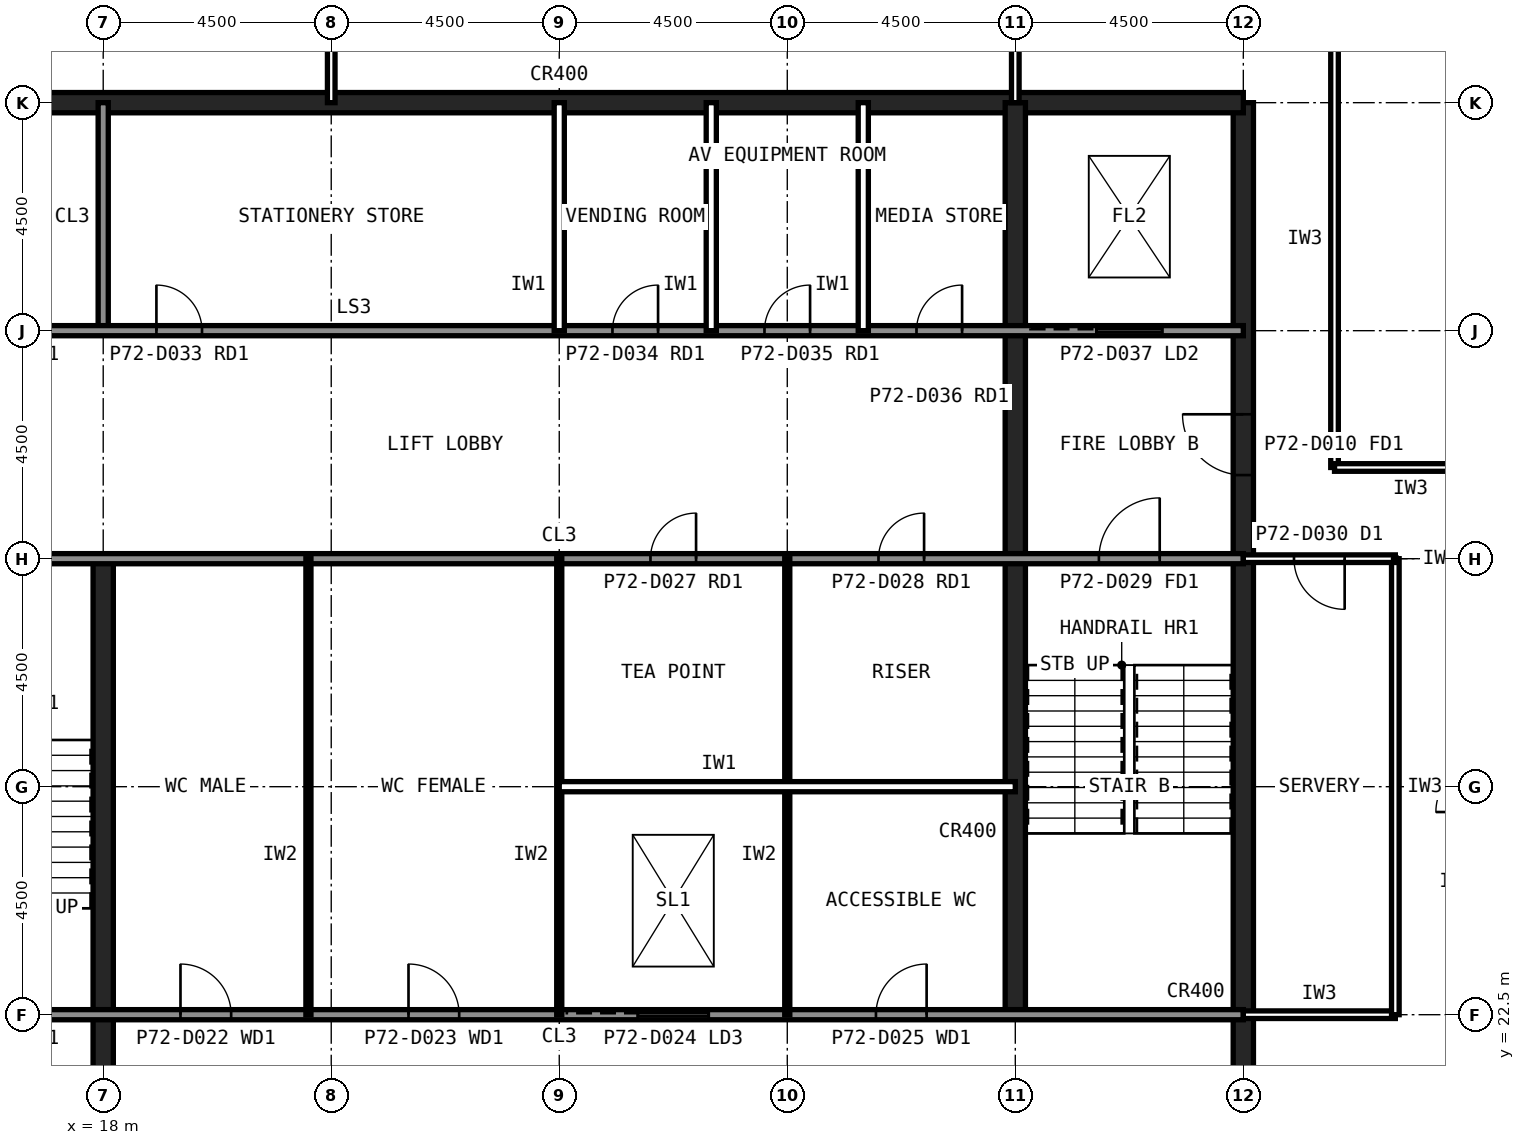
"""IFC4 building model, lengths in metres.
Left out: names, types, materials, properties, quantities, classifications, styles, units other than length and angle.
Written with IfcOpenShell. Run it as: python <this file> out.ifc"""

import sys

from ifc_helpers import new_model, si_unit, direction, frame, frame_2d, origin, place, context, subcontext, project, spatial, rectangle, extrude, element, fill, save


model = new_model("IFC4")
c1 = context("Model", 3, precision=1e-05, world=origin(), true_north=direction((0.0, 1.0)))
c2 = subcontext(c1, "Body", "Model", "MODEL_VIEW")
j1 = project(units=[si_unit("LENGTHUNIT", "METRE"), si_unit("PLANEANGLEUNIT", "RADIAN")], contexts=[c1])
p1 = place(None, origin())
s1 = spatial("IfcSite", under=j1, at=p1, CompositionType="ELEMENT")
p2 = place(p1, origin())
s2 = spatial("IfcBuilding", under=s1, at=p2, CompositionType="ELEMENT")
p3 = place(p2, frame((0.0, 0.0, 302.6)))
s3 = spatial("IfcBuildingStorey", under=s2, at=p3, CompositionType="ELEMENT", Elevation=302.6)
p4 = place(p3, frame((40.5, 13.5, 0.0), z_axis=(0.0, 0.0, 1.0), x_axis=(0.0, 1.0, 0.0)))
e1 = element("IfcWall", 1, at=p4, inside=s3, PredefinedType="SHEAR", context=c2, shape_type="SweptSolid", body=[
    extrude(rectangle(XDim=27.0, YDim=0.4, at=frame_2d((13.5, 0.0))), origin(), (0.0, 0.0, 1.0), 4.0),
])
p5 = place(p4, frame((5.85, 0.0, 0.0)))
e2 = element("IfcOpeningElement", 2, at=p5, cuts=e1, PredefinedType="OPENING", context=c2, shape_type="SweptSolid", body=[
    extrude(rectangle(XDim=1.8, YDim=2.1, at=frame_2d((0.9, 1.05))), frame((0.0, 0.21, 0.0), z_axis=(0.0, -1.0, 0.0), x_axis=(1.0, 0.0, 0.0)), (0.0, 0.0, 1.0), 0.42),
])
p6 = place(p4, frame((19.65, 0.0, 0.0)))
e3 = element("IfcOpeningElement", 3, at=p6, cuts=e1, PredefinedType="OPENING", context=c2, shape_type="SweptSolid", body=[
    extrude(rectangle(XDim=1.2, YDim=2.1, at=frame_2d((0.6, 1.05))), frame((0.0, 0.21, 0.0), z_axis=(0.0, -1.0, 0.0), x_axis=(1.0, 0.0, 0.0)), (0.0, 0.0, 1.0), 0.42),
])
p7 = place(p3, frame((40.5, 40.5, 0.0), z_axis=(0.0, 0.0, 1.0), x_axis=(-1.0, 0.0, 0.0)))
e4 = element("IfcWall", 4, at=p7, inside=s3, PredefinedType="SHEAR", context=c2, shape_type="SweptSolid", body=[
    extrude(rectangle(XDim=27.0, YDim=0.4, at=frame_2d((13.5, 0.0))), origin(), (0.0, 0.0, 1.0), 4.0),
])
p8 = place(p3, frame((18.0, 13.5, 0.0), z_axis=(0.0, 0.0, 1.0), x_axis=(0.0, 1.0, 0.0)))
e5 = element("IfcWall", 5, at=p8, inside=s3, PredefinedType="SHEAR", context=c2, shape_type="SweptSolid", body=[
    extrude(rectangle(XDim=18.0, YDim=0.4, at=frame_2d((9.0, 0.0))), origin(), (0.0, 0.0, 1.0), 4.0),
])
p9 = place(p3, frame((18.0, 36.0, 0.0), z_axis=(0.0, 0.0, 1.0), x_axis=(0.0, 1.0, 0.0)))
e6 = element("IfcWall", 6, at=p9, inside=s3, PredefinedType="SOLIDWALL", context=c2, shape_type="SweptSolid", body=[
    extrude(rectangle(XDim=4.5, YDim=0.2, at=frame_2d((2.25, 0.0))), origin(), (0.0, 0.0, 1.0), 3.84),
])
p10 = place(p3, frame((36.0, 22.5, 0.0), z_axis=(0.0, 0.0, 1.0), x_axis=(0.0, 1.0, 0.0)))
e7 = element("IfcWall", 7, at=p10, inside=s3, PredefinedType="SHEAR", context=c2, shape_type="SweptSolid", body=[
    extrude(rectangle(XDim=18.0, YDim=0.4, at=frame_2d((9.0, 0.0))), origin(), (0.0, 0.0, 1.0), 4.0),
])
p11 = place(p3, frame((13.5, 36.0, 0.0), z_axis=(0.0, 0.0, 1.0), x_axis=(1.0, 0.0, 0.0)))
e8 = element("IfcWall", 8, at=p11, inside=s3, PredefinedType="SOLIDWALL", context=c2, shape_type="SweptSolid", body=[
    extrude(rectangle(XDim=27.0, YDim=0.2, at=frame_2d((13.5, 0.0))), origin(), (0.0, 0.0, 1.0), 3.84),
])
p12 = place(p11, frame((1.8, 0.0, 0.0)))
e9 = element("IfcOpeningElement", 9, at=p12, cuts=e8, PredefinedType="OPENING", context=c2, shape_type="SweptSolid", body=[
    extrude(rectangle(XDim=0.9, YDim=2.1, at=frame_2d((0.45, 1.05))), frame((0.0, 0.11, 0.0), z_axis=(0.0, -1.0, 0.0), x_axis=(1.0, 0.0, 0.0)), (0.0, 0.0, 1.0), 0.22),
])
p13 = place(p11, frame((5.55, 0.0, 0.0)))
e10 = element("IfcOpeningElement", 10, at=p13, cuts=e8, PredefinedType="OPENING", context=c2, shape_type="SweptSolid", body=[
    extrude(rectangle(XDim=0.9, YDim=2.1, at=frame_2d((0.45, 1.05))), frame((0.0, 0.11, 0.0), z_axis=(0.0, -1.0, 0.0), x_axis=(1.0, 0.0, 0.0)), (0.0, 0.0, 1.0), 0.22),
])
p14 = place(p11, frame((14.55, 0.0, 0.0)))
e11 = element("IfcOpeningElement", 11, at=p14, cuts=e8, PredefinedType="OPENING", context=c2, shape_type="SweptSolid", body=[
    extrude(rectangle(XDim=0.9, YDim=2.1, at=frame_2d((0.45, 1.05))), frame((0.0, 0.11, 0.0), z_axis=(0.0, -1.0, 0.0), x_axis=(1.0, 0.0, 0.0)), (0.0, 0.0, 1.0), 0.22),
])
p15 = place(p11, frame((17.55, 0.0, 0.0)))
e12 = element("IfcOpeningElement", 12, at=p15, cuts=e8, PredefinedType="OPENING", context=c2, shape_type="SweptSolid", body=[
    extrude(rectangle(XDim=0.9, YDim=2.1, at=frame_2d((0.45, 1.05))), frame((0.0, 0.11, 0.0), z_axis=(0.0, -1.0, 0.0), x_axis=(1.0, 0.0, 0.0)), (0.0, 0.0, 1.0), 0.22),
])
p16 = place(p11, frame((20.55, 0.0, 0.0)))
e13 = element("IfcOpeningElement", 13, at=p16, cuts=e8, PredefinedType="OPENING", context=c2, shape_type="SweptSolid", body=[
    extrude(rectangle(XDim=0.9, YDim=2.1, at=frame_2d((0.45, 1.05))), frame((0.0, 0.11, 0.0), z_axis=(0.0, -1.0, 0.0), x_axis=(1.0, 0.0, 0.0)), (0.0, 0.0, 1.0), 0.22),
])
p17 = place(p11, frame((24.1, 0.0, 0.0)))
e14 = element("IfcOpeningElement", 14, at=p17, cuts=e8, PredefinedType="OPENING", context=c2, shape_type="SweptSolid", body=[
    extrude(rectangle(XDim=1.3, YDim=2.2, at=frame_2d((0.65, 1.1))), frame((0.0, 0.11, 0.0), z_axis=(0.0, -1.0, 0.0), x_axis=(1.0, 0.0, 0.0)), (0.0, 0.0, 1.0), 0.22),
])
p18 = place(p3, frame((13.5, 22.5, 0.0), z_axis=(0.0, 0.0, 1.0), x_axis=(1.0, 0.0, 0.0)))
e15 = element("IfcWall", 15, at=p18, inside=s3, PredefinedType="SOLIDWALL", context=c2, shape_type="SweptSolid", body=[
    extrude(rectangle(XDim=27.0, YDim=0.2, at=frame_2d((13.5, 0.0))), origin(), (0.0, 0.0, 1.0), 3.84),
])
p19 = place(p18, frame((1.65, 0.0, 0.0)))
e16 = element("IfcOpeningElement", 16, at=p19, cuts=e15, PredefinedType="OPENING", context=c2, shape_type="SweptSolid", body=[
    extrude(rectangle(XDim=1.2, YDim=2.1, at=frame_2d((0.6, 1.05))), frame((0.0, 0.11, 0.0), z_axis=(0.0, -1.0, 0.0), x_axis=(1.0, 0.0, 0.0)), (0.0, 0.0, 1.0), 0.22),
])
p20 = place(p18, frame((6.025, 0.0, 0.0)))
e17 = element("IfcOpeningElement", 17, at=p20, cuts=e15, PredefinedType="OPENING", context=c2, shape_type="SweptSolid", body=[
    extrude(rectangle(XDim=1.0, YDim=2.1, at=frame_2d((0.5, 1.05))), frame((0.0, 0.11, 0.0), z_axis=(0.0, -1.0, 0.0), x_axis=(1.0, 0.0, 0.0)), (0.0, 0.0, 1.0), 0.22),
])
p21 = place(p18, frame((10.525, 0.0, 0.0)))
e18 = element("IfcOpeningElement", 18, at=p21, cuts=e15, PredefinedType="OPENING", context=c2, shape_type="SweptSolid", body=[
    extrude(rectangle(XDim=1.0, YDim=2.1, at=frame_2d((0.5, 1.05))), frame((0.0, 0.11, 0.0), z_axis=(0.0, -1.0, 0.0), x_axis=(1.0, 0.0, 0.0)), (0.0, 0.0, 1.0), 0.22),
])
p22 = place(p18, frame((19.75, 0.0, 0.0)))
e19 = element("IfcOpeningElement", 19, at=p22, cuts=e15, PredefinedType="OPENING", context=c2, shape_type="SweptSolid", body=[
    extrude(rectangle(XDim=1.0, YDim=2.1, at=frame_2d((0.5, 1.05))), frame((0.0, 0.11, 0.0), z_axis=(0.0, -1.0, 0.0), x_axis=(1.0, 0.0, 0.0)), (0.0, 0.0, 1.0), 0.22),
])
p23 = place(p18, frame((15.05, 0.0, 0.0)))
e20 = element("IfcOpeningElement", 20, at=p23, cuts=e15, PredefinedType="OPENING", context=c2, shape_type="SweptSolid", body=[
    extrude(rectangle(XDim=1.4, YDim=2.4, at=frame_2d((0.7, 1.2))), frame((0.0, 0.11, 0.0), z_axis=(0.0, -1.0, 0.0), x_axis=(1.0, 0.0, 0.0)), (0.0, 0.0, 1.0), 0.22),
])
p24 = place(p3, frame((13.5, 31.5, 0.0), z_axis=(0.0, 0.0, 1.0), x_axis=(1.0, 0.0, 0.0)))
e21 = element("IfcWall", 21, at=p24, inside=s3, PredefinedType="SOLIDWALL", context=c2, shape_type="SweptSolid", body=[
    extrude(rectangle(XDim=27.0, YDim=0.2, at=frame_2d((13.5, 0.0))), origin(), (0.0, 0.0, 1.0), 3.84),
])
p25 = place(p24, frame((24.15, 0.0, 0.0)))
e22 = element("IfcOpeningElement", 22, at=p25, cuts=e21, PredefinedType="OPENING", context=c2, shape_type="SweptSolid", body=[
    extrude(rectangle(XDim=1.2, YDim=2.1, at=frame_2d((0.6, 1.05))), frame((0.0, 0.11, 0.0), z_axis=(0.0, -1.0, 0.0), x_axis=(1.0, 0.0, 0.0)), (0.0, 0.0, 1.0), 0.22),
])
p26 = place(p24, frame((15.3, 0.0, 0.0)))
e23 = element("IfcOpeningElement", 23, at=p26, cuts=e21, PredefinedType="OPENING", context=c2, shape_type="SweptSolid", body=[
    extrude(rectangle(XDim=0.9, YDim=2.1, at=frame_2d((0.45, 1.05))), frame((0.0, 0.11, 0.0), z_axis=(0.0, -1.0, 0.0), x_axis=(1.0, 0.0, 0.0)), (0.0, 0.0, 1.0), 0.22),
])
p27 = place(p24, frame((19.8, 0.0, 0.0)))
e24 = element("IfcOpeningElement", 24, at=p27, cuts=e21, PredefinedType="OPENING", context=c2, shape_type="SweptSolid", body=[
    extrude(rectangle(XDim=0.9, YDim=2.1, at=frame_2d((0.45, 1.05))), frame((0.0, 0.11, 0.0), z_axis=(0.0, -1.0, 0.0), x_axis=(1.0, 0.0, 0.0)), (0.0, 0.0, 1.0), 0.22),
])
for number, where, z_axis, x_axis in (
    (25, (27.0, 36.0, 0.0), (0.0, 0.0, 1.0), (0.0, 1.0, 0.0)),
    (26, (30.0, 36.0, 0.0), (0.0, 0.0, 1.0), (0.0, 1.0, 0.0)),
    (27, (33.0, 36.0, 0.0), (0.0, 0.0, 1.0), (0.0, 1.0, 0.0)),
):
    element("IfcWall", number, at=place(p3, frame(where, z_axis=z_axis, x_axis=x_axis)), inside=s3, PredefinedType="PARTITIONING", context=c2, shape_type="SweptSolid", body=[
        extrude(rectangle(XDim=4.5, YDim=0.2, at=frame_2d((2.25, 0.0))), origin(), (0.0, 0.0, 1.0), 3.84),
    ])
for number, where, z_axis, x_axis in (
    (28, (22.05, 22.5, 0.0), (0.0, 0.0, 1.0), (0.0, 1.0, 0.0)),
    (29, (27.0, 22.5, 0.0), (0.0, 0.0, 1.0), (0.0, 1.0, 0.0)),
    (30, (31.5, 22.5, 0.0), (0.0, 0.0, 1.0), (0.0, 1.0, 0.0)),
):
    element("IfcWall", number, at=place(p3, frame(where, z_axis=z_axis, x_axis=x_axis)), inside=s3, PredefinedType="PLUMBINGWALL", context=c2, shape_type="SweptSolid", body=[
        extrude(rectangle(XDim=9.0, YDim=0.1, at=frame_2d((4.5, 0.0))), origin(), (0.0, 0.0, 1.0), 3.84),
    ])
p28 = place(p3, frame((27.0, 27.0, 0.0), z_axis=(0.0, 0.0, 1.0), x_axis=(1.0, 0.0, 0.0)))
e31 = element("IfcWall", 31, at=p28, inside=s3, PredefinedType="PARTITIONING", context=c2, shape_type="SweptSolid", body=[
    extrude(rectangle(XDim=9.0, YDim=0.2, at=frame_2d((4.5, 0.0))), origin(), (0.0, 0.0, 1.0), 3.84),
])
p29 = place(p3, frame((42.3, 33.3, 0.0), z_axis=(0.0, 0.0, 1.0), x_axis=(0.0, 1.0, 0.0)))
e32 = element("IfcWall", 32, at=p29, inside=s3, PredefinedType="PARTITIONING", context=c2, shape_type="SweptSolid", body=[
    extrude(rectangle(XDim=9.0, YDim=0.15, at=frame_2d((4.5, 0.0))), origin(), (0.0, 0.0, 1.0), 3.84),
])
p30 = place(p3, frame((45.3, 33.3, 0.0), z_axis=(0.0, 0.0, 1.0), x_axis=(-1.0, 0.0, 0.0)))
e33 = element("IfcWall", 33, at=p30, inside=s3, PredefinedType="PARTITIONING", context=c2, shape_type="SweptSolid", body=[
    extrude(rectangle(XDim=3.0, YDim=0.15, at=frame_2d((1.5, 0.0))), origin(), (0.0, 0.0, 1.0), 3.84),
])
p31 = place(p3, frame((40.5, 22.5, 0.0), z_axis=(0.0, 0.0, 1.0), x_axis=(1.0, 0.0, 0.0)))
e34 = element("IfcWall", 34, at=p31, inside=s3, PredefinedType="PARTITIONING", context=c2, shape_type="SweptSolid", body=[
    extrude(rectangle(XDim=3.0, YDim=0.15, at=frame_2d((1.5, 0.0))), origin(), (0.0, 0.0, 1.0), 2.989),
])
p32 = place(p3, frame((43.5, 22.5, 0.0), z_axis=(0.0, 0.0, 1.0), x_axis=(0.0, 1.0, 0.0)))
e35 = element("IfcWall", 35, at=p32, inside=s3, PredefinedType="PARTITIONING", context=c2, shape_type="SweptSolid", body=[
    extrude(rectangle(XDim=9.0, YDim=0.15, at=frame_2d((4.5, 0.0))), origin(), (0.0, 0.0, 1.0), 3.84),
])
p33 = place(p3, frame((43.5, 31.5, 0.0), z_axis=(0.0, 0.0, 1.0), x_axis=(-1.0, 0.0, 0.0)))
e36 = element("IfcWall", 36, at=p33, inside=s3, PredefinedType="PARTITIONING", context=c2, shape_type="SweptSolid", body=[
    extrude(rectangle(XDim=3.0, YDim=0.15, at=frame_2d((1.5, 0.0))), origin(), (0.0, 0.0, 1.0), 2.989),
])
p34 = place(p33, frame((1.0, 0.0, 0.0)))
e37 = element("IfcOpeningElement", 37, at=p34, cuts=e36, PredefinedType="OPENING", context=c2, shape_type="SweptSolid", body=[
    extrude(rectangle(XDim=1.0, YDim=2.1, at=frame_2d((0.5, 1.05))), frame((0.0, 0.085, 0.0), z_axis=(0.0, -1.0, 0.0), x_axis=(1.0, 0.0, 0.0)), (0.0, 0.0, 1.0), 0.17),
])
p35 = place(p3, frame((36.0, 40.5, 0.0), z_axis=(0.0, 0.0, 1.0), x_axis=(0.0, 1.0, 0.0)))
e38 = element("IfcWall", 38, at=p35, inside=s3, PredefinedType="PARTITIONING", context=c2, shape_type="SweptSolid", body=[
    extrude(rectangle(XDim=4.5, YDim=0.15, at=frame_2d((2.25, 0.0))), origin(), (0.0, 0.0, 1.0), 2.989),
])
p36 = place(p3, frame((22.5, 45.0, 0.0), z_axis=(0.0, 0.0, 1.0), x_axis=(0.0, -1.0, 0.0)))
e39 = element("IfcWall", 39, at=p36, inside=s3, PredefinedType="PARTITIONING", context=c2, shape_type="SweptSolid", body=[
    extrude(rectangle(XDim=4.5, YDim=0.15, at=frame_2d((2.25, 0.0))), origin(), (0.0, 0.0, 1.0), 2.989),
])
p37 = place(p36, frame((1.75, 0.0, 0.0)))
e40 = element("IfcOpeningElement", 40, at=p37, cuts=e39, PredefinedType="OPENING", context=c2, shape_type="SweptSolid", body=[
    extrude(rectangle(XDim=1.0, YDim=2.1, at=frame_2d((0.5, 1.05))), frame((0.0, 0.085, 0.0), z_axis=(0.0, -1.0, 0.0), x_axis=(1.0, 0.0, 0.0)), (0.0, 0.0, 1.0), 0.17),
])
p38 = place(p6, origin())
e41 = element("IfcDoor", 41, at=p38, inside=s3, OperationType="SINGLE_SWING_RIGHT", PredefinedType="DOOR", context=c2, shape_type="SweptSolid", body=[
    extrude(rectangle(XDim=1.2, YDim=2.1, at=frame_2d((0.6, 1.05))), frame((0.0, 0.025, 0.0), z_axis=(0.0, -1.0, 0.0), x_axis=(1.0, 0.0, 0.0)), (0.0, 0.0, 1.0), 0.05),
])
fill(e3, e41)
p39 = place(p25, origin())
e42 = element("IfcDoor", 42, at=p39, inside=s3, OperationType="SINGLE_SWING_RIGHT", PredefinedType="DOOR", context=c2, shape_type="SweptSolid", body=[
    extrude(rectangle(XDim=1.2, YDim=2.1, at=frame_2d((0.6, 1.05))), frame((0.0, 0.025, 0.0), z_axis=(0.0, -1.0, 0.0), x_axis=(1.0, 0.0, 0.0)), (0.0, 0.0, 1.0), 0.05),
])
fill(e22, e42)
p40 = place(p20, origin())
e43 = element("IfcDoor", 43, at=p40, inside=s3, OperationType="SINGLE_SWING_LEFT", PredefinedType="DOOR", context=c2, shape_type="SweptSolid", body=[
    extrude(rectangle(XDim=1.0, YDim=2.1, at=frame_2d((0.5, 1.05))), frame((0.0, 0.025, 0.0), z_axis=(0.0, -1.0, 0.0), x_axis=(1.0, 0.0, 0.0)), (0.0, 0.0, 1.0), 0.05),
])
fill(e17, e43)
p41 = place(p21, origin())
e44 = element("IfcDoor", 44, at=p41, inside=s3, OperationType="SINGLE_SWING_LEFT", PredefinedType="DOOR", context=c2, shape_type="SweptSolid", body=[
    extrude(rectangle(XDim=1.0, YDim=2.1, at=frame_2d((0.5, 1.05))), frame((0.0, 0.025, 0.0), z_axis=(0.0, -1.0, 0.0), x_axis=(1.0, 0.0, 0.0)), (0.0, 0.0, 1.0), 0.05),
])
fill(e18, e44)
p42 = place(p22, origin())
e45 = element("IfcDoor", 45, at=p42, inside=s3, OperationType="SINGLE_SWING_RIGHT", PredefinedType="DOOR", context=c2, shape_type="SweptSolid", body=[
    extrude(rectangle(XDim=1.0, YDim=2.1, at=frame_2d((0.5, 1.05))), frame((0.0, 0.025, 0.0), z_axis=(0.0, -1.0, 0.0), x_axis=(1.0, 0.0, 0.0)), (0.0, 0.0, 1.0), 0.05),
])
fill(e19, e45)
p43 = place(p26, origin())
e46 = element("IfcDoor", 46, at=p43, inside=s3, OperationType="SINGLE_SWING_RIGHT", PredefinedType="DOOR", context=c2, shape_type="SweptSolid", body=[
    extrude(rectangle(XDim=0.9, YDim=2.1, at=frame_2d((0.45, 1.05))), frame((0.0, 0.025, 0.0), z_axis=(0.0, -1.0, 0.0), x_axis=(1.0, 0.0, 0.0)), (0.0, 0.0, 1.0), 0.05),
])
fill(e23, e46)
p44 = place(p27, origin())
e47 = element("IfcDoor", 47, at=p44, inside=s3, OperationType="SINGLE_SWING_RIGHT", PredefinedType="DOOR", context=c2, shape_type="SweptSolid", body=[
    extrude(rectangle(XDim=0.9, YDim=2.1, at=frame_2d((0.45, 1.05))), frame((0.0, 0.025, 0.0), z_axis=(0.0, -1.0, 0.0), x_axis=(1.0, 0.0, 0.0)), (0.0, 0.0, 1.0), 0.05),
])
fill(e24, e47)
p45 = place(p13, origin())
e48 = element("IfcDoor", 48, at=p45, inside=s3, OperationType="SINGLE_SWING_LEFT", PredefinedType="DOOR", context=c2, shape_type="SweptSolid", body=[
    extrude(rectangle(XDim=0.9, YDim=2.1, at=frame_2d((0.45, 1.05))), frame((0.0, 0.025, 0.0), z_axis=(0.0, -1.0, 0.0), x_axis=(1.0, 0.0, 0.0)), (0.0, 0.0, 1.0), 0.05),
])
fill(e10, e48)
p46 = place(p14, origin())
e49 = element("IfcDoor", 49, at=p46, inside=s3, OperationType="SINGLE_SWING_RIGHT", PredefinedType="DOOR", context=c2, shape_type="SweptSolid", body=[
    extrude(rectangle(XDim=0.9, YDim=2.1, at=frame_2d((0.45, 1.05))), frame((0.0, 0.025, 0.0), z_axis=(0.0, -1.0, 0.0), x_axis=(1.0, 0.0, 0.0)), (0.0, 0.0, 1.0), 0.05),
])
fill(e11, e49)
p47 = place(p15, origin())
e50 = element("IfcDoor", 50, at=p47, inside=s3, OperationType="SINGLE_SWING_RIGHT", PredefinedType="DOOR", context=c2, shape_type="SweptSolid", body=[
    extrude(rectangle(XDim=0.9, YDim=2.1, at=frame_2d((0.45, 1.05))), frame((0.0, 0.025, 0.0), z_axis=(0.0, -1.0, 0.0), x_axis=(1.0, 0.0, 0.0)), (0.0, 0.0, 1.0), 0.05),
])
fill(e12, e50)
p48 = place(p16, origin())
e51 = element("IfcDoor", 51, at=p48, inside=s3, OperationType="SINGLE_SWING_RIGHT", PredefinedType="DOOR", context=c2, shape_type="SweptSolid", body=[
    extrude(rectangle(XDim=0.9, YDim=2.1, at=frame_2d((0.45, 1.05))), frame((0.0, 0.025, 0.0), z_axis=(0.0, -1.0, 0.0), x_axis=(1.0, 0.0, 0.0)), (0.0, 0.0, 1.0), 0.05),
])
fill(e13, e51)
p49 = place(p17, origin())
e52 = element("IfcDoor", 52, at=p49, inside=s3, OperationType="SLIDING_TO_LEFT", PredefinedType="DOOR", context=c2, shape_type="SweptSolid", body=[
    extrude(rectangle(XDim=1.3, YDim=2.2, at=frame_2d((0.65, 1.1))), frame((0.0, 0.025, 0.0), z_axis=(0.0, -1.0, 0.0), x_axis=(1.0, 0.0, 0.0)), (0.0, 0.0, 1.0), 0.05),
])
fill(e14, e52)
p50 = place(p23, origin())
e53 = element("IfcDoor", 53, at=p50, inside=s3, OperationType="SLIDING_TO_LEFT", PredefinedType="DOOR", context=c2, shape_type="SweptSolid", body=[
    extrude(rectangle(XDim=1.4, YDim=2.4, at=frame_2d((0.7, 1.2))), frame((0.0, 0.025, 0.0), z_axis=(0.0, -1.0, 0.0), x_axis=(1.0, 0.0, 0.0)), (0.0, 0.0, 1.0), 0.05),
])
fill(e20, e53)
p51 = place(p34, origin())
e54 = element("IfcDoor", 54, at=p51, inside=s3, OperationType="SINGLE_SWING_LEFT", PredefinedType="DOOR", context=c2, shape_type="SweptSolid", body=[
    extrude(rectangle(XDim=1.0, YDim=2.1, at=frame_2d((0.5, 1.05))), frame((0.0, 0.025, 0.0), z_axis=(0.0, -1.0, 0.0), x_axis=(1.0, 0.0, 0.0)), (0.0, 0.0, 1.0), 0.05),
])
fill(e37, e54)
save(model, sys.argv[1])
